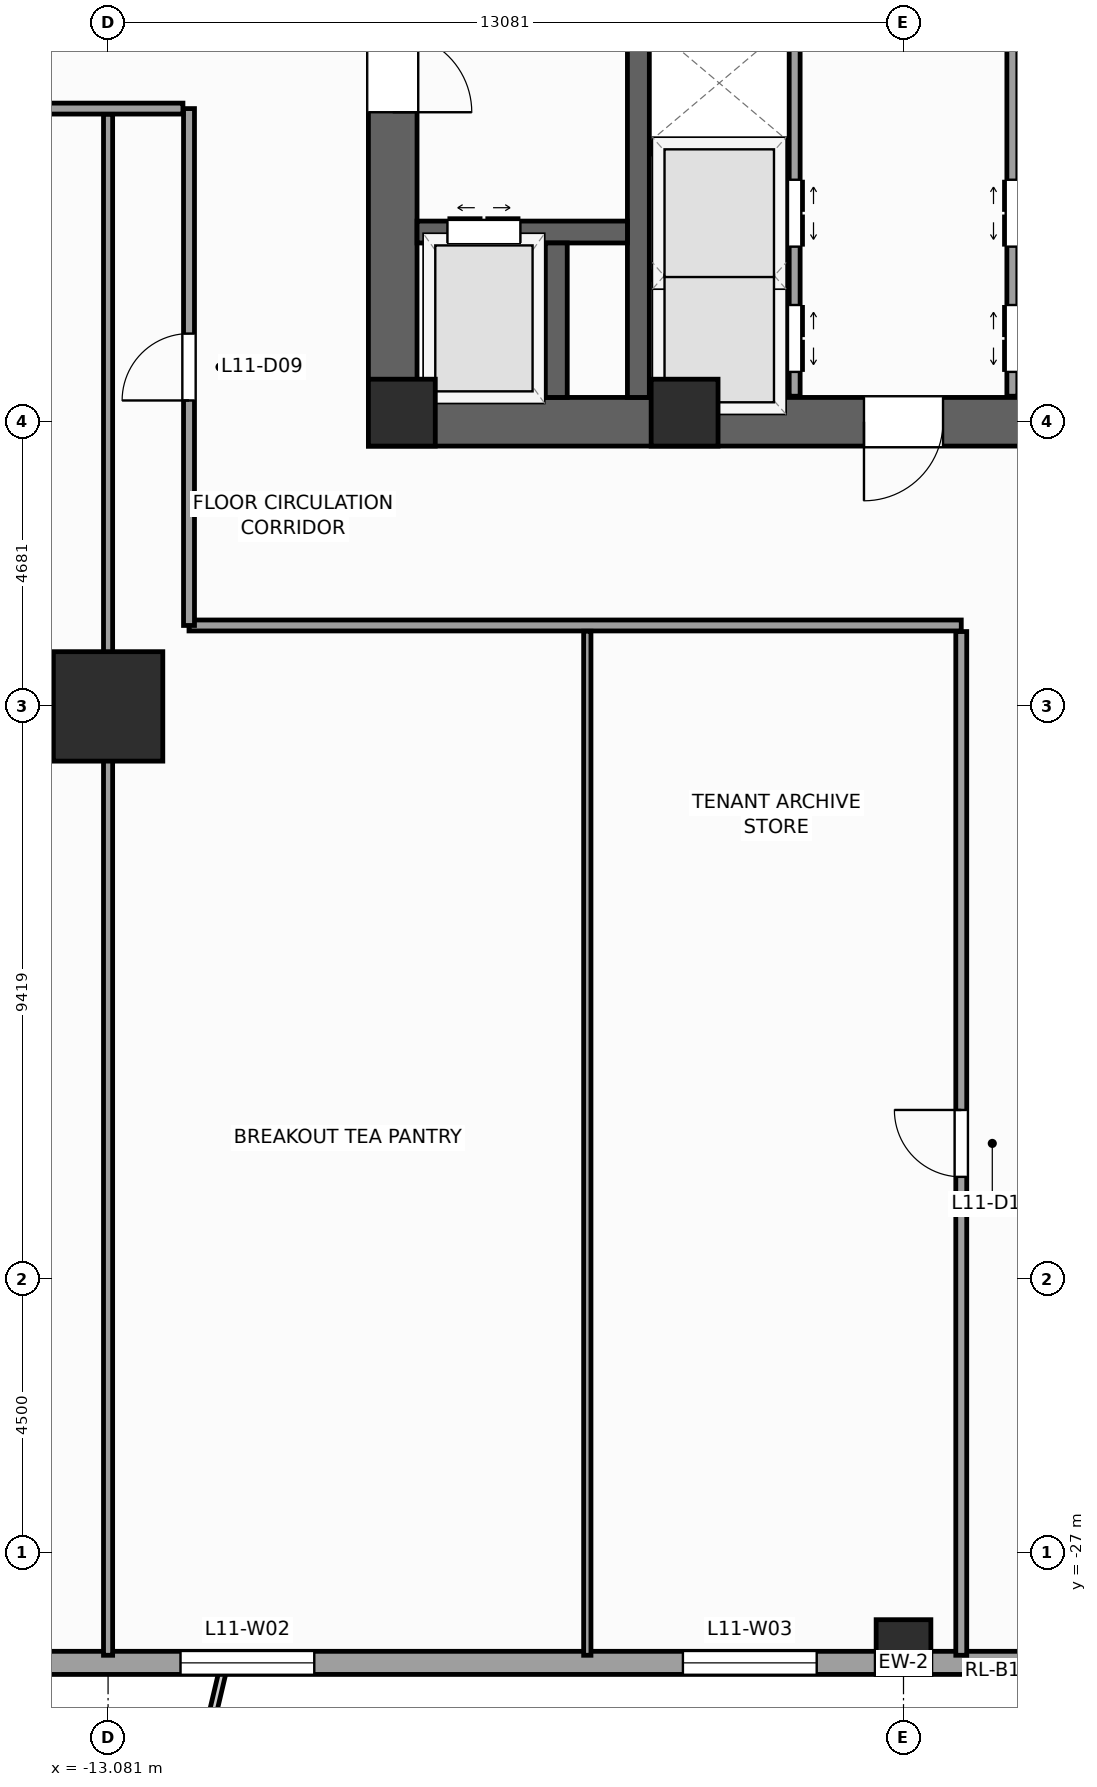
"""IFC4 building model, lengths in metres.
Left out: names, types, materials, properties, quantities, classifications, styles, units other than length and angle.
Written with IfcOpenShell. Run it as: python <this file> out.ifc"""

import sys

from ifc_helpers import new_model, si_unit, direction, frame, frame_2d, origin, origin_2d, place, context, subcontext, project, spatial, rectangle, extrude, source, transform, mapped, element, fill, save


model = new_model("IFC4")
c1 = context("Model", 3, precision=1e-05, world=origin(), true_north=direction((0.0, 1.0)))
c2 = subcontext(c1, "Body", "Model", "MODEL_VIEW")
j1 = project(units=[si_unit("LENGTHUNIT", "METRE"), si_unit("PLANEANGLEUNIT", "RADIAN")], contexts=[c1])
p1 = place(None, origin())
s1 = spatial("IfcSite", under=j1, at=p1, CompositionType="ELEMENT")
p2 = place(p1, origin())
s2 = spatial("IfcBuilding", under=s1, at=p2, CompositionType="ELEMENT")
p3 = place(p2, frame((0.0, 0.0, 50.0)))
s3 = spatial("IfcBuildingStorey", under=s2, at=p3, CompositionType="ELEMENT", Elevation=50.0)
p4 = place(p3, frame((-8.8, -8.4, 0.0), z_axis=(0.0, 0.0, 1.0), x_axis=(1.0, 0.0, 0.0)))
e1 = element("IfcWall", 1, at=p4, inside=s3, PredefinedType="SHEAR", context=c2, shape_type="SweptSolid", body=[
    extrude(rectangle(XDim=17.6, YDim=0.8, at=frame_2d((8.8, 0.0))), origin(), (0.0, 0.0, 1.0), 4.0),
])
p5 = place(p4, frame((8.15, 0.0, 0.0)))
e2 = element("IfcOpeningElement", 2, at=p5, cuts=e1, PredefinedType="OPENING", context=c2, shape_type="SweptSolid", body=[
    extrude(rectangle(XDim=1.3, YDim=2.2, at=frame_2d((0.65, 1.1))), frame((0.0, 0.41, 0.0), z_axis=(0.0, -1.0, 0.0), x_axis=(1.0, 0.0, 0.0)), (0.0, 0.0, 1.0), 0.82),
])
p6 = place(p3, frame((-8.4, -8.0, 0.0), z_axis=(0.0, 0.0, 1.0), x_axis=(0.0, 1.0, 0.0)))
e3 = element("IfcWall", 3, at=p6, inside=s3, PredefinedType="SHEAR", context=c2, shape_type="SweptSolid", body=[
    extrude(rectangle(XDim=16.0, YDim=0.8, at=frame_2d((8.0, 0.0))), origin(), (0.0, 0.0, 1.0), 4.0),
])
p7 = place(p6, frame((4.69, 0.0, 0.0)))
e4 = element("IfcOpeningElement", 4, at=p7, cuts=e3, PredefinedType="OPENING", context=c2, shape_type="SweptSolid", body=[
    extrude(rectangle(XDim=1.3, YDim=2.2, at=frame_2d((0.65, 1.1))), frame((0.0, 0.41, 0.0), z_axis=(0.0, -1.0, 0.0), x_axis=(1.0, 0.0, 0.0)), (0.0, 0.0, 1.0), 0.82),
])
p8 = place(p3, frame((-4.36, -8.0, 0.0), z_axis=(0.0, 0.0, 1.0), x_axis=(0.0, 1.0, 0.0)))
e5 = element("IfcWall", 5, at=p8, inside=s3, PredefinedType="SHEAR", context=c2, shape_type="SweptSolid", body=[
    extrude(rectangle(XDim=16.0, YDim=0.36, at=frame_2d((8.0, 0.0))), origin(), (0.0, 0.0, 1.0), 4.0),
])
p9 = place(p3, frame((-8.0, -5.28, 0.0), z_axis=(0.0, 0.0, 1.0), x_axis=(1.0, 0.0, 0.0)))
e6 = element("IfcWall", 6, at=p9, inside=s3, PredefinedType="SHEAR", context=c2, shape_type="SweptSolid", body=[
    extrude(rectangle(XDim=3.46, YDim=0.36, at=frame_2d((1.73, 0.0))), origin(), (0.0, 0.0, 1.0), 4.0),
])
p10 = place(p9, frame((0.5, 0.0, 0.0)))
e7 = element("IfcOpeningElement", 7, at=p10, cuts=e6, PredefinedType="OPENING", context=c2, shape_type="SweptSolid", body=[
    extrude(rectangle(XDim=1.2, YDim=2.25, at=frame_2d((0.6, 1.125))), frame((0.0, 0.19, 0.0), z_axis=(0.0, -1.0, 0.0), x_axis=(1.0, 0.0, 0.0)), (0.0, 0.0, 1.0), 0.38),
])
p11 = place(p3, frame((-5.71, -8.0, 0.0), z_axis=(0.0, 0.0, 1.0), x_axis=(0.0, 1.0, 0.0)))
e8 = element("IfcWall", 8, at=p11, inside=s3, PredefinedType="SHEAR", context=c2, shape_type="SweptSolid", body=[
    extrude(rectangle(XDim=2.54, YDim=0.36, at=frame_2d((1.27, 0.0))), origin(), (0.0, 0.0, 1.0), 4.0),
])
m1 = source(origin(), c2, "Body", "SweptSolid", [
    extrude(rectangle(XDim=1.1, YDim=1.1, at=origin_2d()), origin(), (0.0, 0.0, 1.0), 4.0),
])
for number, where, z_axis, x_axis in (
    (9, (-8.25, -8.25, 0.0), (0.0, 0.0, 1.0), (1.0, 0.0, 0.0)),
    (10, (-3.6, -8.25, 0.0), (0.0, 0.0, 1.0), (1.0, 0.0, 0.0)),
):
    element("IfcColumn", number, at=place(p3, frame(where, z_axis=z_axis, x_axis=x_axis)), inside=s3, PredefinedType="PILASTER", context=c2, shape_type="MappedRepresentation", body=[
        mapped(m1, transform((0.0, 0.0, 0.0), scale=1.0)),
    ])
m2 = source(origin(), c2, "Body", "SweptSolid", [
    extrude(rectangle(XDim=1.8, YDim=1.8, at=origin_2d()), origin(), (0.0, 0.0, 1.0), 4.0),
])
p12 = place(p3, frame((-13.081, -13.081, 0.0), z_axis=(0.0, 0.0, 1.0), x_axis=(1.0, 0.0, 0.0)))
e11 = element("IfcColumn", 11, at=p12, inside=s3, PredefinedType="COLUMN", context=c2, shape_type="MappedRepresentation", body=[
    mapped(m2, transform((0.0, 0.0, 0.0), scale=1.0)),
])
m3 = source(origin(), c2, "Body", "SweptSolid", [
    extrude(rectangle(XDim=0.9, YDim=0.9, at=origin_2d()), origin(), (0.0, 0.0, 1.0), 4.0),
])
p13 = place(p3, frame((0.0, -28.55, 0.0), z_axis=(0.0, 0.0, 1.0), x_axis=(1.0, 0.0, 0.0)))
e12 = element("IfcColumn", 12, at=p13, inside=s3, PredefinedType="COLUMN", context=c2, shape_type="MappedRepresentation", body=[
    mapped(m3, transform((0.0, 0.0, 0.0), scale=1.0)),
])
p14 = place(p3, frame((-25.69, -28.81, 0.0), z_axis=(0.0, 0.0, 1.0), x_axis=(1.0, 0.0, 0.0)))
e13 = element("IfcWall", 13, at=p14, inside=s3, PredefinedType="STANDARD", context=c2, shape_type="SweptSolid", body=[
    extrude(rectangle(XDim=51.38, YDim=0.38, at=frame_2d((25.69, 0.0))), origin(), (0.0, 0.0, 1.0), 3.12),
])
p15 = place(p14, frame((29.915, 0.0, 0.0)))
e14 = element("IfcOpeningElement", 14, at=p15, cuts=e13, PredefinedType="OPENING", context=c2, shape_type="SweptSolid", body=[
    extrude(rectangle(XDim=1.05, YDim=2.25, at=frame_2d((0.525, 1.125))), frame((0.0, 0.2, 0.0), z_axis=(0.0, -1.0, 0.0), x_axis=(1.0, 0.0, 0.0)), (0.0, 0.0, 1.0), 0.4),
])
p16 = place(p14, frame((5.466, 0.0, 0.49)))
e15 = element("IfcOpeningElement", 15, at=p16, cuts=e13, PredefinedType="OPENING", context=c2, shape_type="SweptSolid", body=[
    extrude(rectangle(XDim=1.4, YDim=2.4, at=frame_2d((0.7, 1.2))), frame((0.0, 0.2, 0.0), z_axis=(0.0, -1.0, 0.0), x_axis=(1.0, 0.0, 0.0)), (0.0, 0.0, 1.0), 0.4),
])
p17 = place(p14, frame((13.8, 0.0, 0.49)))
e16 = element("IfcOpeningElement", 16, at=p17, cuts=e13, PredefinedType="OPENING", context=c2, shape_type="SweptSolid", body=[
    extrude(rectangle(XDim=2.2, YDim=2.4, at=frame_2d((1.1, 1.2))), frame((0.0, 0.2, 0.0), z_axis=(0.0, -1.0, 0.0), x_axis=(1.0, 0.0, 0.0)), (0.0, 0.0, 1.0), 0.4),
])
p18 = place(p14, frame((22.062, 0.0, 0.49)))
e17 = element("IfcOpeningElement", 17, at=p18, cuts=e13, PredefinedType="OPENING", context=c2, shape_type="SweptSolid", body=[
    extrude(rectangle(XDim=2.2, YDim=2.4, at=frame_2d((1.1, 1.2))), frame((0.0, 0.2, 0.0), z_axis=(0.0, -1.0, 0.0), x_axis=(1.0, 0.0, 0.0)), (0.0, 0.0, 1.0), 0.4),
])
p19 = place(p14, frame((33.838, 0.0, 0.49)))
e18 = element("IfcOpeningElement", 18, at=p19, cuts=e13, PredefinedType="OPENING", context=c2, shape_type="SweptSolid", body=[
    extrude(rectangle(XDim=2.2, YDim=2.4, at=frame_2d((1.1, 1.2))), frame((0.0, 0.2, 0.0), z_axis=(0.0, -1.0, 0.0), x_axis=(1.0, 0.0, 0.0)), (0.0, 0.0, 1.0), 0.4),
])
p20 = place(p14, frame((43.487, 0.0, 0.49)))
e19 = element("IfcOpeningElement", 19, at=p20, cuts=e13, PredefinedType="OPENING", context=c2, shape_type="SweptSolid", body=[
    extrude(rectangle(XDim=1.4, YDim=2.4, at=frame_2d((0.7, 1.2))), frame((0.0, 0.2, 0.0), z_axis=(0.0, -1.0, 0.0), x_axis=(1.0, 0.0, 0.0)), (0.0, 0.0, 1.0), 0.4),
])
p21 = place(p3, frame((-1.79, -7.98, 0.0), z_axis=(0.0, 0.0, 1.0), x_axis=(0.0, 1.0, 0.0)))
e20 = element("IfcWall", 20, at=p21, inside=s3, PredefinedType="PARTITIONING", context=c2, shape_type="SweptSolid", body=[
    extrude(rectangle(XDim=12.38, YDim=0.18, at=frame_2d((6.19, 0.0))), origin(), (0.0, 0.0, 1.0), 3.72),
])
p22 = place(p21, frame((0.4, 0.0, 0.0)))
e21 = element("IfcOpeningElement", 21, at=p22, cuts=e20, PredefinedType="OPENING", context=c2, shape_type="SweptSolid", body=[
    extrude(rectangle(XDim=1.1, YDim=2.2, at=frame_2d((0.55, 1.1))), frame((0.0, 0.1, 0.0), z_axis=(0.0, -1.0, 0.0), x_axis=(1.0, 0.0, 0.0)), (0.0, 0.0, 1.0), 0.2),
])
p23 = place(p21, frame((2.46, 0.0, 0.0)))
e22 = element("IfcOpeningElement", 22, at=p23, cuts=e20, PredefinedType="OPENING", context=c2, shape_type="SweptSolid", body=[
    extrude(rectangle(XDim=1.1, YDim=2.2, at=frame_2d((0.55, 1.1))), frame((0.0, 0.1, 0.0), z_axis=(0.0, -1.0, 0.0), x_axis=(1.0, 0.0, 0.0)), (0.0, 0.0, 1.0), 0.2),
])
p24 = place(p3, frame((1.79, -7.98, 0.0), z_axis=(0.0, 0.0, 1.0), x_axis=(0.0, 1.0, 0.0)))
e23 = element("IfcWall", 23, at=p24, inside=s3, PredefinedType="PARTITIONING", context=c2, shape_type="SweptSolid", body=[
    extrude(rectangle(XDim=12.38, YDim=0.18, at=frame_2d((6.19, 0.0))), origin(), (0.0, 0.0, 1.0), 3.72),
])
p25 = place(p24, frame((0.4, 0.0, 0.0)))
e24 = element("IfcOpeningElement", 24, at=p25, cuts=e23, PredefinedType="OPENING", context=c2, shape_type="SweptSolid", body=[
    extrude(rectangle(XDim=1.1, YDim=2.2, at=frame_2d((0.55, 1.1))), frame((0.0, 0.1, 0.0), z_axis=(0.0, -1.0, 0.0), x_axis=(1.0, 0.0, 0.0)), (0.0, 0.0, 1.0), 0.2),
])
p26 = place(p24, frame((2.46, 0.0, 0.0)))
e25 = element("IfcOpeningElement", 25, at=p26, cuts=e23, PredefinedType="OPENING", context=c2, shape_type="SweptSolid", body=[
    extrude(rectangle(XDim=1.1, YDim=2.2, at=frame_2d((0.55, 1.1))), frame((0.0, 0.1, 0.0), z_axis=(0.0, -1.0, 0.0), x_axis=(1.0, 0.0, 0.0)), (0.0, 0.0, 1.0), 0.2),
])
p27 = place(p3, frame((-4.17, -3.9, 0.0), z_axis=(0.0, 0.0, 1.0), x_axis=(1.0, 0.0, 0.0)))
e26 = element("IfcWall", 26, at=p27, inside=s3, PredefinedType="PARTITIONING", context=c2, shape_type="SweptSolid", body=[
    extrude(rectangle(XDim=2.28, YDim=0.18, at=frame_2d((1.14, 0.0))), origin(), (0.0, 0.0, 1.0), 3.72),
])
p28 = place(p3, frame((-4.16, -6.0, 0.0), z_axis=(0.0, 0.0, 1.0), x_axis=(1.0, 0.0, 0.0)))
e27 = element("IfcWall", 27, at=p28, inside=s3, PredefinedType="PARTITIONING", context=c2, shape_type="SweptSolid", body=[
    extrude(rectangle(XDim=2.26, YDim=0.12, at=frame_2d((1.13, 0.0))), origin(), (0.0, 0.0, 1.0), 3.72),
])
p29 = place(p3, frame((-11.75, -11.75, 0.0), z_axis=(0.0, 0.0, 1.0), x_axis=(1.0, 0.0, 0.0)))
e28 = element("IfcWall", 28, at=p29, inside=s3, PredefinedType="PARTITIONING", context=c2, shape_type="SweptSolid", body=[
    extrude(rectangle(XDim=12.7, YDim=0.18, at=frame_2d((6.35, 0.0))), origin(), (0.0, 0.0, 1.0), 3.72),
])
p30 = place(p3, frame((-11.75, -11.75, 0.0), z_axis=(0.0, 0.0, 1.0), x_axis=(0.0, 1.0, 0.0)))
e29 = element("IfcWall", 29, at=p30, inside=s3, PredefinedType="PARTITIONING", context=c2, shape_type="SweptSolid", body=[
    extrude(rectangle(XDim=8.5, YDim=0.18, at=frame_2d((4.25, 0.0))), origin(), (0.0, 0.0, 1.0), 3.72),
])
p31 = place(p30, frame((3.7, 0.0, 0.0)))
e30 = element("IfcOpeningElement", 30, at=p31, cuts=e29, PredefinedType="OPENING", context=c2, shape_type="SweptSolid", body=[
    extrude(rectangle(XDim=1.1, YDim=2.2, at=frame_2d((0.55, 1.1))), frame((0.0, 0.1, 0.0), z_axis=(0.0, -1.0, 0.0), x_axis=(1.0, 0.0, 0.0)), (0.0, 0.0, 1.0), 0.2),
])
p32 = place(p3, frame((-28.685, -3.25, 0.0), z_axis=(0.0, 0.0, 1.0), x_axis=(1.0, 0.0, 0.0)))
e31 = element("IfcWall", 31, at=p32, inside=s3, PredefinedType="PARTITIONING", context=c2, shape_type="SweptSolid", body=[
    extrude(rectangle(XDim=16.835, YDim=0.18, at=frame_2d((8.417, 0.0))), origin(), (0.0, 0.0, 1.0), 3.72),
])
p33 = place(p32, frame((7.417, 0.0, 0.0)))
e32 = element("IfcOpeningElement", 32, at=p33, cuts=e31, PredefinedType="OPENING", context=c2, shape_type="SweptSolid", body=[
    extrude(rectangle(XDim=1.1, YDim=2.2, at=frame_2d((0.55, 1.1))), frame((0.0, 0.1, 0.0), z_axis=(0.0, -1.0, 0.0), x_axis=(1.0, 0.0, 0.0)), (0.0, 0.0, 1.0), 0.2),
])
p34 = place(p3, frame((0.95, -28.685, 0.0), z_axis=(0.0, 0.0, 1.0), x_axis=(0.0, 1.0, 0.0)))
e33 = element("IfcWall", 33, at=p34, inside=s3, PredefinedType="PARTITIONING", context=c2, shape_type="SweptSolid", body=[
    extrude(rectangle(XDim=16.835, YDim=0.18, at=frame_2d((8.417, 0.0))), origin(), (0.0, 0.0, 1.0), 3.72),
])
p35 = place(p34, frame((7.867, 0.0, 0.0)))
e34 = element("IfcOpeningElement", 34, at=p35, cuts=e33, PredefinedType="OPENING", context=c2, shape_type="SweptSolid", body=[
    extrude(rectangle(XDim=1.1, YDim=2.2, at=frame_2d((0.55, 1.1))), frame((0.0, 0.1, 0.0), z_axis=(0.0, -1.0, 0.0), x_axis=(1.0, 0.0, 0.0)), (0.0, 0.0, 1.0), 0.2),
])
p36 = place(p3, frame((-13.081, -28.685, 0.0), z_axis=(0.0, 0.0, 1.0), x_axis=(0.0, 1.0, 0.0)))
e35 = element("IfcWall", 35, at=p36, inside=s3, PredefinedType="PARTITIONING", context=c2, shape_type="SweptSolid", body=[
    extrude(rectangle(XDim=25.34, YDim=0.15, at=frame_2d((12.67, 0.0))), origin(), (0.0, 0.0, 1.0), 2.712),
])
p37 = place(p3, frame((-5.2, -28.685, 0.0), z_axis=(0.0, 0.0, 1.0), x_axis=(0.0, 1.0, 0.0)))
e36 = element("IfcWall", 36, at=p37, inside=s3, PredefinedType="PARTITIONING", context=c2, shape_type="SweptSolid", body=[
    extrude(rectangle(XDim=16.84, YDim=0.12, at=frame_2d((8.42, 0.0))), origin(), (0.0, 0.0, 1.0), 3.72),
])
m4 = source(origin(), c2, "Body", "SweptSolid", [
    extrude(rectangle(XDim=2.2, YDim=2.4, at=frame_2d((1.1, 1.2))), frame((0.0, 0.03, 0.0), z_axis=(0.0, -1.0, 0.0), x_axis=(1.0, 0.0, 0.0)), (0.0, 0.0, 1.0), 0.06),
])
p38 = place(p17, origin())
e37 = element("IfcWindow", 37, at=p38, inside=s3, PartitioningType="SINGLE_PANEL", PredefinedType="WINDOW", context=c2, shape_type="MappedRepresentation", body=[
    mapped(m4, transform((0.0, 0.0, 0.0), scale=1.0)),
])
fill(e16, e37)
p39 = place(p18, origin())
e38 = element("IfcWindow", 38, at=p39, inside=s3, PartitioningType="SINGLE_PANEL", PredefinedType="WINDOW", context=c2, shape_type="MappedRepresentation", body=[
    mapped(m4, transform((0.0, 0.0, 0.0), scale=1.0)),
])
fill(e17, e38)
m5 = source(origin(), c2, "Body", "SweptSolid", [
    extrude(rectangle(XDim=1.3, YDim=2.2, at=frame_2d((0.65, 1.1))), frame((0.0, 0.025, 0.0), z_axis=(0.0, -1.0, 0.0), x_axis=(1.0, 0.0, 0.0)), (0.0, 0.0, 1.0), 0.05),
])
p40 = place(p7, frame((1.3, 0.0, 0.0), z_axis=(0.0, 0.0, 1.0), x_axis=(-1.0, 0.0, 0.0)))
e39 = element("IfcDoor", 39, at=p40, inside=s3, OperationType="SINGLE_SWING_LEFT", PredefinedType="DOOR", context=c2, shape_type="MappedRepresentation", body=[
    mapped(m5, transform((0.0, 0.0, 0.0), scale=1.0)),
])
fill(e4, e39)
p41 = place(p5, frame((1.3, 0.0, 0.0), z_axis=(0.0, 0.0, 1.0), x_axis=(-1.0, 0.0, 0.0)))
e40 = element("IfcDoor", 40, at=p41, inside=s3, OperationType="SINGLE_SWING_LEFT", PredefinedType="DOOR", context=c2, shape_type="MappedRepresentation", body=[
    mapped(m5, transform((0.0, 0.0, 0.0), scale=1.0)),
])
fill(e2, e40)
m6 = source(origin(), c2, "Body", "SweptSolid", [
    extrude(rectangle(XDim=1.2, YDim=2.25, at=frame_2d((0.6, 1.125))), frame((0.0, 0.025, 0.0), z_axis=(0.0, -1.0, 0.0), x_axis=(1.0, 0.0, 0.0)), (0.0, 0.0, 1.0), 0.05),
])
p42 = place(p10, origin())
e41 = element("IfcDoor", 41, at=p42, inside=s3, OperationType="DOUBLE_DOOR_SLIDING", PredefinedType="DOOR", context=c2, shape_type="MappedRepresentation", body=[
    mapped(m6, transform((0.0, 0.0, 0.0), scale=1.0)),
])
fill(e7, e41)
m7 = source(origin(), c2, "Body", "SweptSolid", [
    extrude(rectangle(XDim=1.1, YDim=2.2, at=frame_2d((0.55, 1.1))), frame((0.0, 0.025, 0.0), z_axis=(0.0, -1.0, 0.0), x_axis=(1.0, 0.0, 0.0)), (0.0, 0.0, 1.0), 0.05),
])
p43 = place(p22, frame((1.1, 0.0, 0.0), z_axis=(0.0, 0.0, 1.0), x_axis=(-1.0, 0.0, 0.0)))
e42 = element("IfcDoor", 42, at=p43, inside=s3, OperationType="DOUBLE_DOOR_SLIDING", PredefinedType="DOOR", context=c2, shape_type="MappedRepresentation", body=[
    mapped(m7, transform((0.0, 0.0, 0.0), scale=1.0)),
])
fill(e21, e42)
p44 = place(p23, frame((1.1, 0.0, 0.0), z_axis=(0.0, 0.0, 1.0), x_axis=(-1.0, 0.0, 0.0)))
e43 = element("IfcDoor", 43, at=p44, inside=s3, OperationType="DOUBLE_DOOR_SLIDING", PredefinedType="DOOR", context=c2, shape_type="MappedRepresentation", body=[
    mapped(m7, transform((0.0, 0.0, 0.0), scale=1.0)),
])
fill(e22, e43)
p45 = place(p25, origin())
e44 = element("IfcDoor", 44, at=p45, inside=s3, OperationType="DOUBLE_DOOR_SLIDING", PredefinedType="DOOR", context=c2, shape_type="MappedRepresentation", body=[
    mapped(m7, transform((0.0, 0.0, 0.0), scale=1.0)),
])
fill(e24, e44)
p46 = place(p26, origin())
e45 = element("IfcDoor", 45, at=p46, inside=s3, OperationType="DOUBLE_DOOR_SLIDING", PredefinedType="DOOR", context=c2, shape_type="MappedRepresentation", body=[
    mapped(m7, transform((0.0, 0.0, 0.0), scale=1.0)),
])
fill(e25, e45)
p47 = place(p31, origin())
e46 = element("IfcDoor", 46, at=p47, inside=s3, OperationType="SINGLE_SWING_LEFT", PredefinedType="DOOR", context=c2, shape_type="MappedRepresentation", body=[
    mapped(m7, transform((0.0, 0.0, 0.0), scale=1.0)),
])
fill(e30, e46)
p48 = place(p35, origin())
e47 = element("IfcDoor", 47, at=p48, inside=s3, OperationType="SINGLE_SWING_RIGHT", PredefinedType="DOOR", context=c2, shape_type="MappedRepresentation", body=[
    mapped(m7, transform((0.0, 0.0, 0.0), scale=1.0)),
])
fill(e34, e47)
save(model, sys.argv[1])
